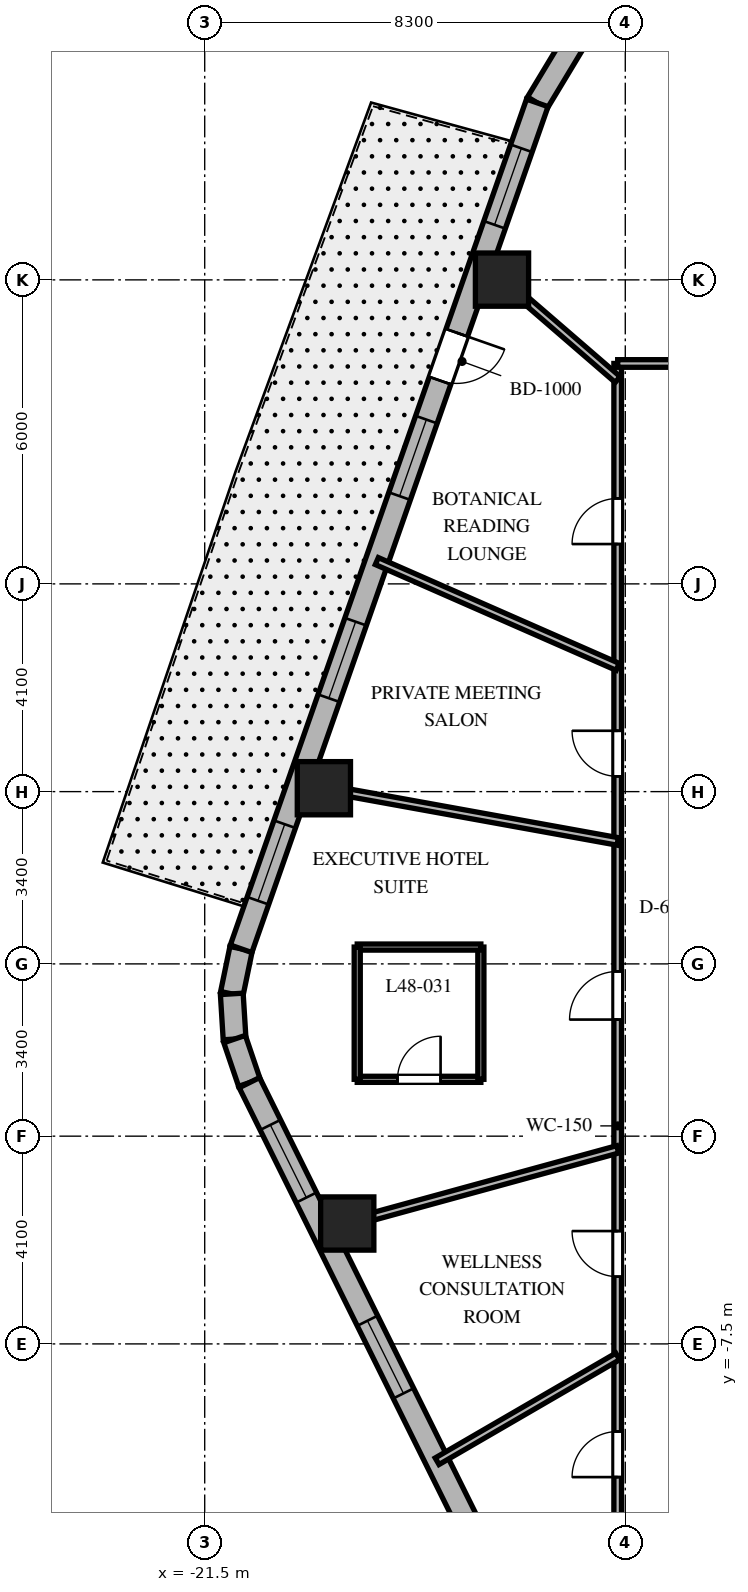
"""IFC4 building model, lengths in metres.
Left out: names, types, materials, properties, quantities, classifications, styles, units other than length and angle.
Written with IfcOpenShell. Run it as: python <this file> out.ifc"""

import sys

from ifc_helpers import new_model, si_unit, direction, frame, frame_2d, origin, origin_2d, place, context, subcontext, project, spatial, rectangle, extrude, element, fill, save


model = new_model("IFC4")
c1 = context("Model", 3, precision=1e-05, world=origin(), true_north=direction((0.0, 1.0)))
c2 = subcontext(c1, "Body", "Model", "MODEL_VIEW")
j1 = project(units=[si_unit("LENGTHUNIT", "METRE"), si_unit("PLANEANGLEUNIT", "RADIAN")], contexts=[c1])
p1 = place(None, origin())
s1 = spatial("IfcSite", under=j1, at=p1, CompositionType="ELEMENT")
p2 = place(p1, origin())
s2 = spatial("IfcBuilding", under=s1, at=p2, CompositionType="ELEMENT")
p3 = place(p2, frame((0.0, 0.0, 194.1)))
s3 = spatial("IfcBuildingStorey", under=s2, at=p3, CompositionType="ELEMENT", Elevation=194.1)
for number, where, z_axis, x_axis in (
    (1, (-15.633, 13.505, 0.0), (0.0, 0.0, 1.0), (1.0, 0.0, 0.0)),
    (2, (-19.148, 3.467, 0.0), (0.0, 0.0, 1.0), (1.0, 0.0, 0.0)),
    (3, (-18.687, -5.124, 0.0), (0.0, 0.0, 1.0), (1.0, 0.0, 0.0)),
):
    element("IfcColumn", number, at=place(p3, frame(where, z_axis=z_axis, x_axis=x_axis)), inside=s3, PredefinedType="COLUMN", context=c2, shape_type="SweptSolid", body=[
        extrude(rectangle(XDim=1.05, YDim=1.05, at=origin_2d()), origin(), (0.0, 0.0, 1.0), 3.7),
    ])
p4 = place(p3, frame((-14.214, 18.192, 0.0), z_axis=(0.0, 0.0, 1.0), x_axis=(-0.516340945502, -0.856383108193, 0.0)))
e4 = element("IfcWall", 4, at=p4, inside=s3, PredefinedType="SOLIDWALL", context=c2, shape_type="SweptSolid", body=[
    extrude(rectangle(XDim=1.4, YDim=0.45, at=frame_2d((0.7, 0.0))), origin(), (0.0, 0.0, 1.0), 3.4),
])
p5 = place(p3, frame((-20.782, 0.298, 0.0), z_axis=(0.0, 0.0, 1.0), x_axis=(-0.202570068411, -0.979267771033, 0.0)))
e5 = element("IfcWall", 5, at=p5, inside=s3, PredefinedType="SOLIDWALL", context=c2, shape_type="SweptSolid", body=[
    extrude(rectangle(XDim=0.909, YDim=0.45, at=frame_2d((0.454, 0.0))), origin(), (0.0, 0.0, 1.0), 3.4),
])
p6 = place(p3, frame((-20.966, -0.592, 0.0), z_axis=(0.0, 0.0, 1.0), x_axis=(0.061748898935, -0.998091715966, 0.0)))
e6 = element("IfcWall", 6, at=p6, inside=s3, PredefinedType="SOLIDWALL", context=c2, shape_type="SweptSolid", body=[
    extrude(rectangle(XDim=0.894, YDim=0.45, at=frame_2d((0.447, 0.0))), origin(), (0.0, 0.0, 1.0), 3.4),
])
p7 = place(p3, frame((-20.911, -1.484, 0.0), z_axis=(0.0, 0.0, 1.0), x_axis=(0.321623334353, -0.946867694453, 0.0)))
e7 = element("IfcWall", 7, at=p7, inside=s3, PredefinedType="SOLIDWALL", context=c2, shape_type="SweptSolid", body=[
    extrude(rectangle(XDim=0.909, YDim=0.45, at=frame_2d((0.454, 0.0))), origin(), (0.0, 0.0, 1.0), 3.4),
])
p8 = place(p3, frame((-14.937, 16.993, 0.0), z_axis=(0.0, 0.0, 1.0), x_axis=(-0.330431575061, -0.943829949834, 0.0)))
e8 = element("IfcWall", 8, at=p8, inside=s3, PredefinedType="SOLIDWALL", context=c2, shape_type="SweptSolid", body=[
    extrude(rectangle(XDim=17.689, YDim=0.45, at=frame_2d((8.844, 0.0))), origin(), (0.0, 0.0, 1.0), 3.4),
])
p9 = place(p8, frame((4.807, 0.0, 0.0)))
e9 = element("IfcOpeningElement", 9, at=p9, cuts=e8, PredefinedType="OPENING", context=c2, shape_type="SweptSolid", body=[
    extrude(rectangle(XDim=1.0, YDim=2.15, at=frame_2d((0.5, 1.075))), frame((0.0, 0.235, 0.0), z_axis=(0.0, -1.0, 0.0), x_axis=(1.0, 0.0, 0.0)), (0.0, 0.0, 1.0), 0.47),
])
p10 = place(p8, frame((0.95, 0.0, 0.8)))
e10 = element("IfcOpeningElement", 10, at=p10, cuts=e8, PredefinedType="OPENING", context=c2, shape_type="SweptSolid", body=[
    extrude(rectangle(XDim=1.6, YDim=1.75, at=frame_2d((0.8, 0.875))), frame((0.0, 0.235, 0.0), z_axis=(0.0, -1.0, 0.0), x_axis=(1.0, 0.0, 0.0)), (0.0, 0.0, 1.0), 0.47),
])
p11 = place(p8, frame((6.623, 0.0, 0.8)))
e11 = element("IfcOpeningElement", 11, at=p11, cuts=e8, PredefinedType="OPENING", context=c2, shape_type="SweptSolid", body=[
    extrude(rectangle(XDim=1.6, YDim=1.75, at=frame_2d((0.8, 0.875))), frame((0.0, 0.235, 0.0), z_axis=(0.0, -1.0, 0.0), x_axis=(1.0, 0.0, 0.0)), (0.0, 0.0, 1.0), 0.47),
])
p12 = place(p8, frame((10.849, 0.0, 0.8)))
e12 = element("IfcOpeningElement", 12, at=p12, cuts=e8, PredefinedType="OPENING", context=c2, shape_type="SweptSolid", body=[
    extrude(rectangle(XDim=1.6, YDim=1.75, at=frame_2d((0.8, 0.875))), frame((0.0, 0.235, 0.0), z_axis=(0.0, -1.0, 0.0), x_axis=(1.0, 0.0, 0.0)), (0.0, 0.0, 1.0), 0.47),
])
p13 = place(p8, frame((15.084, 0.0, 0.8)))
e13 = element("IfcOpeningElement", 13, at=p13, cuts=e8, PredefinedType="OPENING", context=c2, shape_type="SweptSolid", body=[
    extrude(rectangle(XDim=1.6, YDim=1.75, at=frame_2d((0.8, 0.875))), frame((0.0, 0.235, 0.0), z_axis=(0.0, -1.0, 0.0), x_axis=(1.0, 0.0, 0.0)), (0.0, 0.0, 1.0), 0.47),
])
p14 = place(p3, frame((-20.618, -2.344, 0.0), z_axis=(0.0, 0.0, 1.0), x_axis=(0.444243691097, -0.895905990002, 0.0)))
e14 = element("IfcWall", 14, at=p14, inside=s3, PredefinedType="SOLIDWALL", context=c2, shape_type="SweptSolid", body=[
    extrude(rectangle(XDim=16.784, YDim=0.45, at=frame_2d((8.392, 0.0))), origin(), (0.0, 0.0, 1.0), 3.4),
])
p15 = place(p14, frame((0.931, 0.0, 0.8)))
e15 = element("IfcOpeningElement", 15, at=p15, cuts=e14, PredefinedType="OPENING", context=c2, shape_type="SweptSolid", body=[
    extrude(rectangle(XDim=1.6, YDim=1.75, at=frame_2d((0.8, 0.875))), frame((0.0, 0.235, 0.0), z_axis=(0.0, -1.0, 0.0), x_axis=(1.0, 0.0, 0.0)), (0.0, 0.0, 1.0), 0.47),
])
p16 = place(p14, frame((5.245, 0.0, 0.8)))
e16 = element("IfcOpeningElement", 16, at=p16, cuts=e14, PredefinedType="OPENING", context=c2, shape_type="SweptSolid", body=[
    extrude(rectangle(XDim=1.6, YDim=1.75, at=frame_2d((0.8, 0.875))), frame((0.0, 0.235, 0.0), z_axis=(0.0, -1.0, 0.0), x_axis=(1.0, 0.0, 0.0)), (0.0, 0.0, 1.0), 0.47),
])
p17 = place(p14, frame((9.936, 0.0, 0.8)))
e17 = element("IfcOpeningElement", 17, at=p17, cuts=e14, PredefinedType="OPENING", context=c2, shape_type="SweptSolid", body=[
    extrude(rectangle(XDim=1.6, YDim=1.75, at=frame_2d((0.8, 0.875))), frame((0.0, 0.235, 0.0), z_axis=(0.0, -1.0, 0.0), x_axis=(1.0, 0.0, 0.0)), (0.0, 0.0, 1.0), 0.47),
])
p18 = place(p14, frame((14.303, 0.0, 0.8)))
e18 = element("IfcOpeningElement", 18, at=p18, cuts=e14, PredefinedType="OPENING", context=c2, shape_type="SweptSolid", body=[
    extrude(rectangle(XDim=1.6, YDim=1.75, at=frame_2d((0.8, 0.875))), frame((0.0, 0.235, 0.0), z_axis=(0.0, -1.0, 0.0), x_axis=(1.0, 0.0, 0.0)), (0.0, 0.0, 1.0), 0.47),
])
p19 = place(p3, frame((-13.35, -11.85, 0.0), z_axis=(0.0, 0.0, 1.0), x_axis=(0.0, 1.0, 0.0)))
e19 = element("IfcWall", 19, at=p19, inside=s3, PredefinedType="PARTITIONING", context=c2, shape_type="SweptSolid", body=[
    extrude(rectangle(XDim=23.7, YDim=0.15, at=frame_2d((11.85, 0.0))), origin(), (0.0, 0.0, 1.0), 2.84),
])
p20 = place(p19, frame((20.136, 0.0, 0.0)))
e20 = element("IfcOpeningElement", 20, at=p20, cuts=e19, PredefinedType="OPENING", context=c2, shape_type="SweptSolid", body=[
    extrude(rectangle(XDim=0.9, YDim=2.03, at=frame_2d((0.45, 1.015))), frame((0.0, 0.085, 0.0), z_axis=(0.0, -1.0, 0.0), x_axis=(1.0, 0.0, 0.0)), (0.0, 0.0, 1.0), 0.17),
])
p21 = place(p19, frame((15.551, 0.0, 0.0)))
e21 = element("IfcOpeningElement", 21, at=p21, cuts=e19, PredefinedType="OPENING", context=c2, shape_type="SweptSolid", body=[
    extrude(rectangle(XDim=0.9, YDim=2.03, at=frame_2d((0.45, 1.015))), frame((0.0, 0.085, 0.0), z_axis=(0.0, -1.0, 0.0), x_axis=(1.0, 0.0, 0.0)), (0.0, 0.0, 1.0), 0.17),
])
p22 = place(p19, frame((10.751, 0.0, 0.0)))
e22 = element("IfcOpeningElement", 22, at=p22, cuts=e19, PredefinedType="OPENING", context=c2, shape_type="SweptSolid", body=[
    extrude(rectangle(XDim=0.95, YDim=2.03, at=frame_2d((0.475, 1.015))), frame((0.0, 0.085, 0.0), z_axis=(0.0, -1.0, 0.0), x_axis=(1.0, 0.0, 0.0)), (0.0, 0.0, 1.0), 0.17),
])
p23 = place(p19, frame((5.677, 0.0, 0.0)))
e23 = element("IfcOpeningElement", 23, at=p23, cuts=e19, PredefinedType="OPENING", context=c2, shape_type="SweptSolid", body=[
    extrude(rectangle(XDim=0.9, YDim=2.03, at=frame_2d((0.45, 1.015))), frame((0.0, 0.085, 0.0), z_axis=(0.0, -1.0, 0.0), x_axis=(1.0, 0.0, 0.0)), (0.0, 0.0, 1.0), 0.17),
])
p24 = place(p19, frame((1.721, 0.0, 0.0)))
e24 = element("IfcOpeningElement", 24, at=p24, cuts=e19, PredefinedType="OPENING", context=c2, shape_type="SweptSolid", body=[
    extrude(rectangle(XDim=0.9, YDim=2.03, at=frame_2d((0.45, 1.015))), frame((0.0, 0.085, 0.0), z_axis=(0.0, -1.0, 0.0), x_axis=(1.0, 0.0, 0.0)), (0.0, 0.0, 1.0), 0.17),
])
p25 = place(p3, frame((-13.35, 11.85, 0.0), z_axis=(0.0, 0.0, 1.0), x_axis=(1.0, 0.0, 0.0)))
e25 = element("IfcWall", 25, at=p25, inside=s3, PredefinedType="PARTITIONING", context=c2, shape_type="SweptSolid", body=[
    extrude(rectangle(XDim=26.7, YDim=0.15, at=frame_2d((13.35, 0.0))), origin(), (0.0, 0.0, 1.0), 2.84),
])
p26 = place(p25, frame((22.201, 0.0, 0.0)))
e26 = element("IfcOpeningElement", 26, at=p26, cuts=e25, PredefinedType="OPENING", context=c2, shape_type="SweptSolid", body=[
    extrude(rectangle(XDim=0.95, YDim=2.03, at=frame_2d((0.475, 1.015))), frame((0.0, 0.085, 0.0), z_axis=(0.0, -1.0, 0.0), x_axis=(1.0, 0.0, 0.0)), (0.0, 0.0, 1.0), 0.17),
])
p27 = place(p25, frame((18.069, 0.0, 0.0)))
e27 = element("IfcOpeningElement", 27, at=p27, cuts=e25, PredefinedType="OPENING", context=c2, shape_type="SweptSolid", body=[
    extrude(rectangle(XDim=0.9, YDim=2.03, at=frame_2d((0.45, 1.015))), frame((0.0, 0.085, 0.0), z_axis=(0.0, -1.0, 0.0), x_axis=(1.0, 0.0, 0.0)), (0.0, 0.0, 1.0), 0.17),
])
p28 = place(p25, frame((12.362, 0.0, 0.0)))
e28 = element("IfcOpeningElement", 28, at=p28, cuts=e25, PredefinedType="OPENING", context=c2, shape_type="SweptSolid", body=[
    extrude(rectangle(XDim=0.95, YDim=2.03, at=frame_2d((0.475, 1.015))), frame((0.0, 0.085, 0.0), z_axis=(0.0, -1.0, 0.0), x_axis=(1.0, 0.0, 0.0)), (0.0, 0.0, 1.0), 0.17),
])
p29 = place(p25, frame((3.995, 0.0, 0.0)))
e29 = element("IfcOpeningElement", 29, at=p29, cuts=e25, PredefinedType="OPENING", context=c2, shape_type="SweptSolid", body=[
    extrude(rectangle(XDim=0.95, YDim=2.03, at=frame_2d((0.475, 1.015))), frame((0.0, 0.085, 0.0), z_axis=(0.0, -1.0, 0.0), x_axis=(1.0, 0.0, 0.0)), (0.0, 0.0, 1.0), 0.17),
])
p30 = place(p3, frame((-13.35, 11.533, 0.0), z_axis=(0.0, 0.0, 1.0), x_axis=(-0.756711647314, 0.65374879183, 0.0)))
e30 = element("IfcWall", 30, at=p30, inside=s3, PredefinedType="PARTITIONING", context=c2, shape_type="SweptSolid", body=[
    extrude(rectangle(XDim=3.55, YDim=0.15, at=frame_2d((1.775, 0.0))), origin(), (0.0, 0.0, 1.0), 2.64),
])
p31 = place(p3, frame((-13.35, 5.863, 0.0), z_axis=(0.0, 0.0, 1.0), x_axis=(-0.9155832175, 0.402128551376, 0.0)))
e31 = element("IfcWall", 31, at=p31, inside=s3, PredefinedType="PARTITIONING", context=c2, shape_type="SweptSolid", body=[
    extrude(rectangle(XDim=5.191, YDim=0.15, at=frame_2d((2.595, 0.0))), origin(), (0.0, 0.0, 1.0), 2.64),
])
p32 = place(p3, frame((-13.35, 2.417, 0.0), z_axis=(0.0, 0.0, 1.0), x_axis=(-0.98399796473, 0.178179699761, 0.0)))
e32 = element("IfcWall", 32, at=p32, inside=s3, PredefinedType="PARTITIONING", context=c2, shape_type="SweptSolid", body=[
    extrude(rectangle(XDim=6.393, YDim=0.15, at=frame_2d((3.197, 0.0))), origin(), (0.0, 0.0, 1.0), 2.64),
])
p33 = place(p3, frame((-13.35, -3.661, 0.0), z_axis=(0.0, 0.0, 1.0), x_axis=(-0.964397145454, -0.264458211898, 0.0)))
e33 = element("IfcWall", 33, at=p33, inside=s3, PredefinedType="PARTITIONING", context=c2, shape_type="SweptSolid", body=[
    extrude(rectangle(XDim=6.039, YDim=0.15, at=frame_2d((3.019, 0.0))), origin(), (0.0, 0.0, 1.0), 2.64),
])
p34 = place(p3, frame((-13.35, -7.748, 0.0), z_axis=(0.0, 0.0, 1.0), x_axis=(-0.864894342526, -0.501953958313, 0.0)))
e34 = element("IfcWall", 34, at=p34, inside=s3, PredefinedType="PARTITIONING", context=c2, shape_type="SweptSolid", body=[
    extrude(rectangle(XDim=4.12, YDim=0.15, at=frame_2d((2.06, 0.0))), origin(), (0.0, 0.0, 1.0), 2.64),
])
p35 = place(p3, frame((-18.49, -2.278, 0.0), z_axis=(0.0, 0.0, 1.0), x_axis=(1.0, 0.0, 0.0)))
e35 = element("IfcWall", 35, at=p35, inside=s3, PredefinedType="PARTITIONING", context=c2, shape_type="SweptSolid", body=[
    extrude(rectangle(XDim=2.44, YDim=0.12, at=frame_2d((1.22, 0.0))), origin(), (0.0, 0.0, 1.0), 3.4),
])
p36 = place(p35, frame((0.795, 0.0, 0.0)))
e36 = element("IfcOpeningElement", 36, at=p36, cuts=e35, PredefinedType="OPENING", context=c2, shape_type="SweptSolid", body=[
    extrude(rectangle(XDim=0.85, YDim=2.03, at=frame_2d((0.425, 1.015))), frame((0.0, 0.07, 0.0), z_axis=(0.0, -1.0, 0.0), x_axis=(1.0, 0.0, 0.0)), (0.0, 0.0, 1.0), 0.14),
])
p37 = place(p3, frame((-16.05, -2.278, 0.0), z_axis=(0.0, 0.0, 1.0), x_axis=(0.0, 1.0, 0.0)))
e37 = element("IfcWall", 37, at=p37, inside=s3, PredefinedType="PARTITIONING", context=c2, shape_type="SweptSolid", body=[
    extrude(rectangle(XDim=2.61, YDim=0.12, at=frame_2d((1.305, 0.0))), origin(), (0.0, 0.0, 1.0), 3.4),
])
p38 = place(p3, frame((-16.05, 0.332, 0.0), z_axis=(0.0, 0.0, 1.0), x_axis=(-1.0, 0.0, 0.0)))
e38 = element("IfcWall", 38, at=p38, inside=s3, PredefinedType="PARTITIONING", context=c2, shape_type="SweptSolid", body=[
    extrude(rectangle(XDim=2.44, YDim=0.12, at=frame_2d((1.22, 0.0))), origin(), (0.0, 0.0, 1.0), 3.4),
])
p39 = place(p3, frame((-18.49, 0.332, 0.0), z_axis=(0.0, 0.0, 1.0), x_axis=(0.0, -1.0, 0.0)))
e39 = element("IfcWall", 39, at=p39, inside=s3, PredefinedType="PARTITIONING", context=c2, shape_type="SweptSolid", body=[
    extrude(rectangle(XDim=2.61, YDim=0.12, at=frame_2d((1.305, 0.0))), origin(), (0.0, 0.0, 1.0), 3.4),
])
p40 = place(p9, origin())
e40 = element("IfcDoor", 40, at=p40, inside=s3, OperationType="SINGLE_SWING_LEFT", PredefinedType="DOOR", context=c2, shape_type="SweptSolid", body=[
    extrude(rectangle(XDim=1.0, YDim=2.15, at=frame_2d((0.5, 1.075))), frame((0.0, 0.025, 0.0), z_axis=(0.0, -1.0, 0.0), x_axis=(1.0, 0.0, 0.0)), (0.0, 0.0, 1.0), 0.05),
])
fill(e9, e40)
p41 = place(p10, origin())
e41 = element("IfcWindow", 41, at=p41, inside=s3, PartitioningType="SINGLE_PANEL", PredefinedType="WINDOW", context=c2, shape_type="SweptSolid", body=[
    extrude(rectangle(XDim=1.6, YDim=1.75, at=frame_2d((0.8, 0.875))), frame((0.0, 0.03, 0.0), z_axis=(0.0, -1.0, 0.0), x_axis=(1.0, 0.0, 0.0)), (0.0, 0.0, 1.0), 0.06),
])
fill(e10, e41)
p42 = place(p11, origin())
e42 = element("IfcWindow", 42, at=p42, inside=s3, PartitioningType="SINGLE_PANEL", PredefinedType="WINDOW", context=c2, shape_type="SweptSolid", body=[
    extrude(rectangle(XDim=1.6, YDim=1.75, at=frame_2d((0.8, 0.875))), frame((0.0, 0.03, 0.0), z_axis=(0.0, -1.0, 0.0), x_axis=(1.0, 0.0, 0.0)), (0.0, 0.0, 1.0), 0.06),
])
fill(e11, e42)
p43 = place(p12, origin())
e43 = element("IfcWindow", 43, at=p43, inside=s3, PartitioningType="SINGLE_PANEL", PredefinedType="WINDOW", context=c2, shape_type="SweptSolid", body=[
    extrude(rectangle(XDim=1.6, YDim=1.75, at=frame_2d((0.8, 0.875))), frame((0.0, 0.03, 0.0), z_axis=(0.0, -1.0, 0.0), x_axis=(1.0, 0.0, 0.0)), (0.0, 0.0, 1.0), 0.06),
])
fill(e12, e43)
p44 = place(p13, origin())
e44 = element("IfcWindow", 44, at=p44, inside=s3, PartitioningType="SINGLE_PANEL", PredefinedType="WINDOW", context=c2, shape_type="SweptSolid", body=[
    extrude(rectangle(XDim=1.6, YDim=1.75, at=frame_2d((0.8, 0.875))), frame((0.0, 0.03, 0.0), z_axis=(0.0, -1.0, 0.0), x_axis=(1.0, 0.0, 0.0)), (0.0, 0.0, 1.0), 0.06),
])
fill(e13, e44)
p45 = place(p15, origin())
e45 = element("IfcWindow", 45, at=p45, inside=s3, PartitioningType="SINGLE_PANEL", PredefinedType="WINDOW", context=c2, shape_type="SweptSolid", body=[
    extrude(rectangle(XDim=1.6, YDim=1.75, at=frame_2d((0.8, 0.875))), frame((0.0, 0.03, 0.0), z_axis=(0.0, -1.0, 0.0), x_axis=(1.0, 0.0, 0.0)), (0.0, 0.0, 1.0), 0.06),
])
fill(e15, e45)
p46 = place(p16, origin())
e46 = element("IfcWindow", 46, at=p46, inside=s3, PartitioningType="SINGLE_PANEL", PredefinedType="WINDOW", context=c2, shape_type="SweptSolid", body=[
    extrude(rectangle(XDim=1.6, YDim=1.75, at=frame_2d((0.8, 0.875))), frame((0.0, 0.03, 0.0), z_axis=(0.0, -1.0, 0.0), x_axis=(1.0, 0.0, 0.0)), (0.0, 0.0, 1.0), 0.06),
])
fill(e16, e46)
p47 = place(p20, origin())
e47 = element("IfcDoor", 47, at=p47, inside=s3, OperationType="SINGLE_SWING_LEFT", PredefinedType="DOOR", context=c2, shape_type="SweptSolid", body=[
    extrude(rectangle(XDim=0.9, YDim=2.03, at=frame_2d((0.45, 1.015))), frame((0.0, 0.025, 0.0), z_axis=(0.0, -1.0, 0.0), x_axis=(1.0, 0.0, 0.0)), (0.0, 0.0, 1.0), 0.05),
])
fill(e20, e47)
p48 = place(p21, origin())
e48 = element("IfcDoor", 48, at=p48, inside=s3, OperationType="SINGLE_SWING_RIGHT", PredefinedType="DOOR", context=c2, shape_type="SweptSolid", body=[
    extrude(rectangle(XDim=0.9, YDim=2.03, at=frame_2d((0.45, 1.015))), frame((0.0, 0.025, 0.0), z_axis=(0.0, -1.0, 0.0), x_axis=(1.0, 0.0, 0.0)), (0.0, 0.0, 1.0), 0.05),
])
fill(e21, e48)
p49 = place(p22, origin())
e49 = element("IfcDoor", 49, at=p49, inside=s3, OperationType="SINGLE_SWING_LEFT", PredefinedType="DOOR", context=c2, shape_type="SweptSolid", body=[
    extrude(rectangle(XDim=0.95, YDim=2.03, at=frame_2d((0.475, 1.015))), frame((0.0, 0.025, 0.0), z_axis=(0.0, -1.0, 0.0), x_axis=(1.0, 0.0, 0.0)), (0.0, 0.0, 1.0), 0.05),
])
fill(e22, e49)
p50 = place(p36, origin())
e50 = element("IfcDoor", 50, at=p50, inside=s3, OperationType="SINGLE_SWING_RIGHT", PredefinedType="DOOR", context=c2, shape_type="SweptSolid", body=[
    extrude(rectangle(XDim=0.85, YDim=2.03, at=frame_2d((0.425, 1.015))), frame((0.0, 0.025, 0.0), z_axis=(0.0, -1.0, 0.0), x_axis=(1.0, 0.0, 0.0)), (0.0, 0.0, 1.0), 0.05),
])
fill(e36, e50)
p51 = place(p23, origin())
e51 = element("IfcDoor", 51, at=p51, inside=s3, OperationType="SINGLE_SWING_RIGHT", PredefinedType="DOOR", context=c2, shape_type="SweptSolid", body=[
    extrude(rectangle(XDim=0.9, YDim=2.03, at=frame_2d((0.45, 1.015))), frame((0.0, 0.025, 0.0), z_axis=(0.0, -1.0, 0.0), x_axis=(1.0, 0.0, 0.0)), (0.0, 0.0, 1.0), 0.05),
])
fill(e23, e51)
p52 = place(p24, origin())
e52 = element("IfcDoor", 52, at=p52, inside=s3, OperationType="SINGLE_SWING_LEFT", PredefinedType="DOOR", context=c2, shape_type="SweptSolid", body=[
    extrude(rectangle(XDim=0.9, YDim=2.03, at=frame_2d((0.45, 1.015))), frame((0.0, 0.025, 0.0), z_axis=(0.0, -1.0, 0.0), x_axis=(1.0, 0.0, 0.0)), (0.0, 0.0, 1.0), 0.05),
])
fill(e24, e52)
save(model, sys.argv[1])
